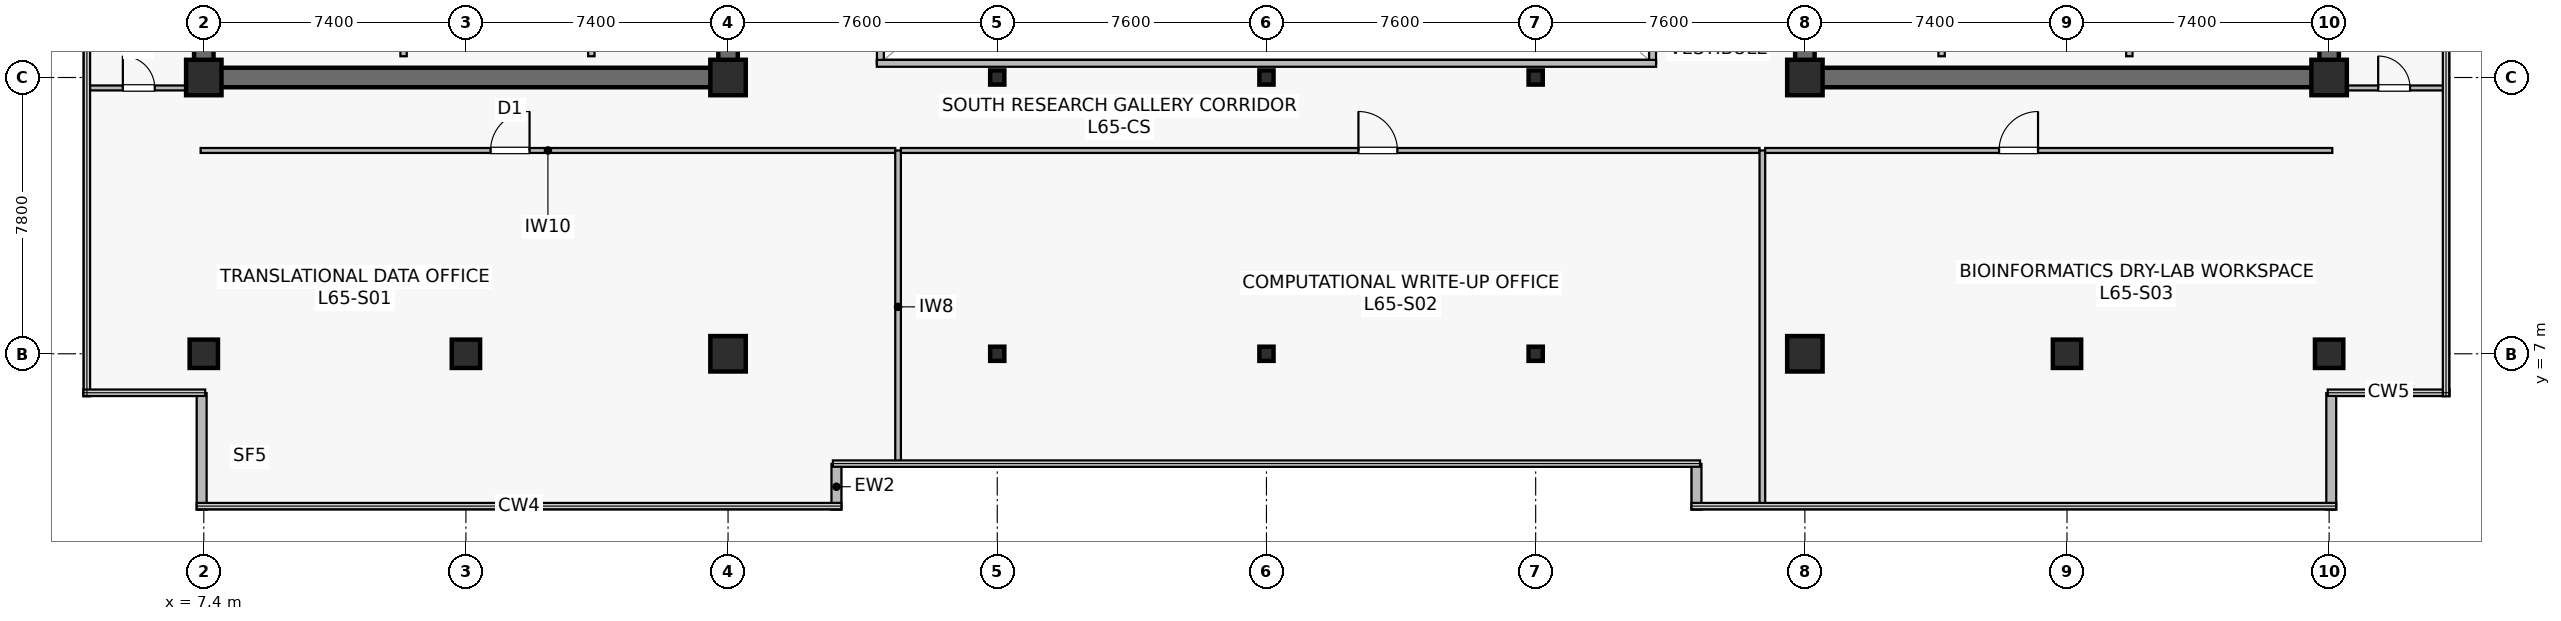
"""IFC4 building model, lengths in metres.
Left out: names, types, materials, properties, quantities, classifications, styles, units other than length and angle.
Written with IfcOpenShell. Run it as: python <this file> out.ifc"""

import sys

from ifc_helpers import new_model, si_unit, direction, frame, frame_2d, origin, origin_2d, place, context, subcontext, project, spatial, rectangle, hollow_rectangle, extrude, source, transform, mapped, element, fill, save


model = new_model("IFC4")
c1 = context("Model", 3, precision=1e-05, world=origin(), true_north=direction((0.0, 1.0)))
c2 = subcontext(c1, "Body", "Model", "MODEL_VIEW")
j1 = project(units=[si_unit("LENGTHUNIT", "METRE"), si_unit("PLANEANGLEUNIT", "RADIAN")], contexts=[c1])
p1 = place(None, origin())
s1 = spatial("IfcSite", under=j1, at=p1, CompositionType="ELEMENT")
p2 = place(p1, origin())
s2 = spatial("IfcBuilding", under=s1, at=p2, CompositionType="ELEMENT")
p3 = place(p2, frame((0.0, 0.0, 271.1)))
s3 = spatial("IfcBuildingStorey", under=s2, at=p3, CompositionType="ELEMENT", Elevation=271.1)
p4 = place(p3, frame((7.125, 14.8, 0.0), z_axis=(0.0, 0.0, 1.0), x_axis=(1.0, 0.0, 0.0)))
e1 = element("IfcWall", 1, at=p4, inside=s3, PredefinedType="SHEAR", context=c2, shape_type="SweptSolid", body=[
    extrude(rectangle(XDim=15.35, YDim=0.55, at=frame_2d((7.675, 0.0))), origin(), (0.0, 0.0, 1.0), 3.8),
])
p5 = place(p3, frame((7.4, 15.075, 0.0), z_axis=(0.0, 0.0, 1.0), x_axis=(0.0, 1.0, 0.0)))
e2 = element("IfcWall", 2, at=p5, inside=s3, PredefinedType="SHEAR", context=c2, shape_type="SweptSolid", body=[
    extrude(rectangle(XDim=18.45, YDim=0.55, at=frame_2d((9.225, 0.0))), origin(), (0.0, 0.0, 1.0), 3.8),
])
p6 = place(p3, frame((22.2, 15.075, 0.0), z_axis=(0.0, 0.0, 1.0), x_axis=(0.0, 1.0, 0.0)))
e3 = element("IfcWall", 3, at=p6, inside=s3, PredefinedType="SHEAR", context=c2, shape_type="SweptSolid", body=[
    extrude(rectangle(XDim=18.45, YDim=0.55, at=frame_2d((9.225, 0.0))), origin(), (0.0, 0.0, 1.0), 3.8),
])
p7 = place(p6, frame((3.475, 0.0, 0.0)))
e4 = element("IfcOpeningElement", 4, at=p7, cuts=e3, PredefinedType="OPENING", context=c2, shape_type="SweptSolid", body=[
    extrude(rectangle(XDim=1.42, YDim=2.2, at=frame_2d((0.71, 1.1))), frame((0.0, 0.285, 0.0), z_axis=(0.0, -1.0, 0.0), x_axis=(1.0, 0.0, 0.0)), (0.0, 0.0, 1.0), 0.57),
])
p8 = place(p3, frame((52.325, 14.8, 0.0), z_axis=(0.0, 0.0, 1.0), x_axis=(1.0, 0.0, 0.0)))
e5 = element("IfcWall", 5, at=p8, inside=s3, PredefinedType="SHEAR", context=c2, shape_type="SweptSolid", body=[
    extrude(rectangle(XDim=15.35, YDim=0.55, at=frame_2d((7.675, 0.0))), origin(), (0.0, 0.0, 1.0), 3.8),
])
p9 = place(p3, frame((52.6, 15.075, 0.0), z_axis=(0.0, 0.0, 1.0), x_axis=(0.0, 1.0, 0.0)))
e6 = element("IfcWall", 6, at=p9, inside=s3, PredefinedType="SHEAR", context=c2, shape_type="SweptSolid", body=[
    extrude(rectangle(XDim=18.45, YDim=0.55, at=frame_2d((9.225, 0.0))), origin(), (0.0, 0.0, 1.0), 3.8),
])
p10 = place(p9, frame((3.475, 0.0, 0.0)))
e7 = element("IfcOpeningElement", 7, at=p10, cuts=e6, PredefinedType="OPENING", context=c2, shape_type="SweptSolid", body=[
    extrude(rectangle(XDim=1.42, YDim=2.2, at=frame_2d((0.71, 1.1))), frame((0.0, 0.285, 0.0), z_axis=(0.0, -1.0, 0.0), x_axis=(1.0, 0.0, 0.0)), (0.0, 0.0, 1.0), 0.57),
])
p11 = place(p3, frame((67.4, 15.075, 0.0), z_axis=(0.0, 0.0, 1.0), x_axis=(0.0, 1.0, 0.0)))
e8 = element("IfcWall", 8, at=p11, inside=s3, PredefinedType="SHEAR", context=c2, shape_type="SweptSolid", body=[
    extrude(rectangle(XDim=18.45, YDim=0.55, at=frame_2d((9.225, 0.0))), origin(), (0.0, 0.0, 1.0), 3.8),
])
m1 = source(origin(), c2, "Body", "SweptSolid", [
    extrude(rectangle(XDim=0.8, YDim=0.8, at=origin_2d()), origin(), (0.0, 0.0, 1.0), 4.1),
])
p12 = place(p3, frame((14.8, 7.0, 0.0), z_axis=(0.0, 0.0, 1.0), x_axis=(1.0, 0.0, 0.0)))
e9 = element("IfcColumn", 9, at=p12, inside=s3, PredefinedType="COLUMN", context=c2, shape_type="MappedRepresentation", body=[
    mapped(m1, transform((0.0, 0.0, 0.0), scale=1.0)),
])
m2 = source(origin(), c2, "Body", "SweptSolid", [
    extrude(rectangle(XDim=1.0, YDim=1.0, at=origin_2d()), origin(), (0.0, 0.0, 1.0), 4.1),
])
for number, where, z_axis, x_axis in (
    (10, (22.2, 7.0, 0.0), (0.0, 0.0, 1.0), (1.0, 0.0, 0.0)),
    (11, (7.4, 14.8, 0.0), (0.0, 0.0, 1.0), (1.0, 0.0, 0.0)),
    (12, (22.2, 14.8, 0.0), (0.0, 0.0, 1.0), (1.0, 0.0, 0.0)),
    (13, (52.6, 7.0, 0.0), (0.0, 0.0, 1.0), (1.0, 0.0, 0.0)),
):
    element("IfcColumn", number, at=place(p3, frame(where, z_axis=z_axis, x_axis=x_axis)), inside=s3, PredefinedType="COLUMN", context=c2, shape_type="MappedRepresentation", body=[
        mapped(m2, transform((0.0, 0.0, 0.0), scale=1.0)),
    ])
p13 = place(p3, frame((60.0, 7.0, 0.0), z_axis=(0.0, 0.0, 1.0), x_axis=(1.0, 0.0, 0.0)))
e14 = element("IfcColumn", 14, at=p13, inside=s3, PredefinedType="COLUMN", context=c2, shape_type="MappedRepresentation", body=[
    mapped(m1, transform((0.0, 0.0, 0.0), scale=1.0)),
])
for number, where, z_axis, x_axis in (
    (15, (52.6, 14.8, 0.0), (0.0, 0.0, 1.0), (1.0, 0.0, 0.0)),
    (16, (67.4, 14.8, 0.0), (0.0, 0.0, 1.0), (1.0, 0.0, 0.0)),
):
    element("IfcColumn", number, at=place(p3, frame(where, z_axis=z_axis, x_axis=x_axis)), inside=s3, PredefinedType="COLUMN", context=c2, shape_type="MappedRepresentation", body=[
        mapped(m2, transform((0.0, 0.0, 0.0), scale=1.0)),
    ])
for number, where, z_axis, x_axis in (
    (17, (7.4, 7.0, 0.0), (0.0, 0.0, 1.0), (1.0, 0.0, 0.0)),
    (18, (67.4, 7.0, 0.0), (0.0, 0.0, 1.0), (1.0, 0.0, 0.0)),
):
    element("IfcColumn", number, at=place(p3, frame(where, z_axis=z_axis, x_axis=x_axis)), inside=s3, PredefinedType="COLUMN", context=c2, shape_type="MappedRepresentation", body=[
        mapped(m1, transform((0.0, 0.0, 0.0), scale=1.0)),
    ])
m3 = source(origin(), c2, "Body", "SweptSolid", [
    extrude(hollow_rectangle(XDim=0.4, YDim=0.4, WallThickness=0.019, at=origin_2d()), origin(), (0.0, 0.0, 1.0), 4.1),
])
for number, where, z_axis, x_axis in (
    (19, (29.8, 7.0, 0.0), (0.0, 0.0, 1.0), (1.0, 0.0, 0.0)),
    (20, (29.8, 14.8, 0.0), (0.0, 0.0, 1.0), (1.0, 0.0, 0.0)),
    (21, (37.4, 7.0, 0.0), (0.0, 0.0, 1.0), (1.0, 0.0, 0.0)),
    (22, (37.4, 14.8, 0.0), (0.0, 0.0, 1.0), (1.0, 0.0, 0.0)),
    (23, (45.0, 7.0, 0.0), (0.0, 0.0, 1.0), (1.0, 0.0, 0.0)),
    (24, (45.0, 14.8, 0.0), (0.0, 0.0, 1.0), (1.0, 0.0, 0.0)),
):
    element("IfcColumn", number, at=place(p3, frame(where, z_axis=z_axis, x_axis=x_axis)), inside=s3, PredefinedType="COLUMN", context=c2, shape_type="MappedRepresentation", body=[
        mapped(m3, transform((0.0, 0.0, 0.0), scale=1.0)),
    ])
for number, where, z_axis, x_axis in (
    (25, (25.26, 2.6, 0.0), (0.0, 0.0, 1.0), (0.0, 1.0, 0.0)),
    (26, (49.54, 3.893, 0.0), (0.0, 0.0, 1.0), (0.0, -1.0, 0.0)),
):
    element("IfcWall", number, at=place(p3, frame(where, z_axis=z_axis, x_axis=x_axis)), inside=s3, PredefinedType="STANDARD", context=c2, shape_type="SweptSolid", body=[
        extrude(rectangle(XDim=1.293, YDim=0.28, at=frame_2d((0.646, 0.0))), origin(), (0.0, 0.0, 1.0), 3.8),
    ])
for number, where, z_axis, x_axis in (
    (27, (67.46, 2.6, 0.0), (0.0, 0.0, 1.0), (0.0, 1.0, 0.0)),
    (28, (7.34, 5.888, 0.0), (0.0, 0.0, 1.0), (0.0, -1.0, 0.0)),
):
    element("IfcWall", number, at=place(p3, frame(where, z_axis=z_axis, x_axis=x_axis)), inside=s3, PredefinedType="STANDARD", context=c2, shape_type="SweptSolid", body=[
        extrude(rectangle(XDim=3.288, YDim=0.28, at=frame_2d((1.644, 0.0))), origin(), (0.0, 0.0, 1.0), 3.8),
    ])
for number, where, z_axis, x_axis in (
    (29, (13.04, 15.4, 0.0), (0.0, 0.0, 1.0), (0.0, 1.0, 0.0)),
    (30, (18.34, 15.4, 0.0), (0.0, 0.0, 1.0), (0.0, 1.0, 0.0)),
    (31, (61.76, 15.4, 0.0), (0.0, 0.0, 1.0), (0.0, 1.0, 0.0)),
    (32, (56.46, 15.4, 0.0), (0.0, 0.0, 1.0), (0.0, 1.0, 0.0)),
):
    element("IfcWall", number, at=place(p3, frame(where, z_axis=z_axis, x_axis=x_axis)), inside=s3, PredefinedType="SOLIDWALL", context=c2, shape_type="SweptSolid", body=[
        extrude(rectangle(XDim=2.4, YDim=0.18, at=frame_2d((1.2, 0.0))), origin(), (0.0, 0.0, 1.0), 3.8),
    ])
p14 = place(p3, frame((26.5, 15.2, 0.0), z_axis=(0.0, 0.0, 1.0), x_axis=(0.0, 1.0, 0.0)))
e33 = element("IfcWall", 33, at=p14, inside=s3, PredefinedType="SOLIDWALL", context=c2, shape_type="SweptSolid", body=[
    extrude(rectangle(XDim=18.2, YDim=0.195, at=frame_2d((9.1, 0.0))), origin(), (0.0, 0.0, 1.0), 3.8),
])
p15 = place(p14, frame((1.8, 0.0, 0.9)))
e34 = element("IfcOpeningElement", 34, at=p15, cuts=e33, PredefinedType="OPENING", context=c2, shape_type="SweptSolid", body=[
    extrude(rectangle(XDim=1.2, YDim=1.35, at=frame_2d((0.6, 0.675))), frame((0.0, 0.107, 0.0), z_axis=(0.0, -1.0, 0.0), x_axis=(1.0, 0.0, 0.0)), (0.0, 0.0, 1.0), 0.215),
])
p16 = place(p14, frame((13.2, 0.0, 0.9)))
e35 = element("IfcOpeningElement", 35, at=p16, cuts=e33, PredefinedType="OPENING", context=c2, shape_type="SweptSolid", body=[
    extrude(rectangle(XDim=1.2, YDim=1.35, at=frame_2d((0.6, 0.675))), frame((0.0, 0.107, 0.0), z_axis=(0.0, -1.0, 0.0), x_axis=(1.0, 0.0, 0.0)), (0.0, 0.0, 1.0), 0.215),
])
p17 = place(p3, frame((48.3, 15.2, 0.0), z_axis=(0.0, 0.0, 1.0), x_axis=(0.0, 1.0, 0.0)))
e36 = element("IfcWall", 36, at=p17, inside=s3, PredefinedType="SOLIDWALL", context=c2, shape_type="SweptSolid", body=[
    extrude(rectangle(XDim=18.2, YDim=0.195, at=frame_2d((9.1, 0.0))), origin(), (0.0, 0.0, 1.0), 3.8),
])
p18 = place(p17, frame((1.8, 0.0, 0.9)))
e37 = element("IfcOpeningElement", 37, at=p18, cuts=e36, PredefinedType="OPENING", context=c2, shape_type="SweptSolid", body=[
    extrude(rectangle(XDim=1.2, YDim=1.35, at=frame_2d((0.6, 0.675))), frame((0.0, 0.107, 0.0), z_axis=(0.0, -1.0, 0.0), x_axis=(1.0, 0.0, 0.0)), (0.0, 0.0, 1.0), 0.215),
])
p19 = place(p17, frame((13.2, 0.0, 0.9)))
e38 = element("IfcOpeningElement", 38, at=p19, cuts=e36, PredefinedType="OPENING", context=c2, shape_type="SweptSolid", body=[
    extrude(rectangle(XDim=1.2, YDim=1.35, at=frame_2d((0.6, 0.675))), frame((0.0, 0.107, 0.0), z_axis=(0.0, -1.0, 0.0), x_axis=(1.0, 0.0, 0.0)), (0.0, 0.0, 1.0), 0.215),
])
p20 = place(p3, frame((26.4, 15.2, 0.0), z_axis=(0.0, 0.0, 1.0), x_axis=(1.0, 0.0, 0.0)))
e39 = element("IfcWall", 39, at=p20, inside=s3, PredefinedType="SOLIDWALL", context=c2, shape_type="SweptSolid", body=[
    extrude(rectangle(XDim=22.0, YDim=0.195, at=frame_2d((11.0, 0.0))), origin(), (0.0, 0.0, 1.0), 3.8),
])
p21 = place(p3, frame((7.31, 12.74, 0.0), z_axis=(0.0, 0.0, 1.0), x_axis=(1.0, 0.0, 0.0)))
e40 = element("IfcWall", 40, at=p21, inside=s3, PredefinedType="PARTITIONING", context=c2, shape_type="SweptSolid", body=[
    extrude(rectangle(XDim=19.61, YDim=0.14, at=frame_2d((9.805, 0.0))), origin(), (0.0, 0.0, 1.0), 3.197),
])
p22 = place(p21, frame((8.186, 0.0, 0.0)))
e41 = element("IfcOpeningElement", 41, at=p22, cuts=e40, PredefinedType="OPENING", context=c2, shape_type="SweptSolid", body=[
    extrude(rectangle(XDim=1.1, YDim=2.18, at=frame_2d((0.55, 1.09))), frame((0.0, 0.08, 0.0), z_axis=(0.0, -1.0, 0.0), x_axis=(1.0, 0.0, 0.0)), (0.0, 0.0, 1.0), 0.16),
])
p23 = place(p3, frame((27.0, 3.91, 0.0), z_axis=(0.0, 0.0, 1.0), x_axis=(0.0, 1.0, 0.0)))
e42 = element("IfcWall", 42, at=p23, inside=s3, PredefinedType="PARTITIONING", context=c2, shape_type="SweptSolid", body=[
    extrude(rectangle(XDim=8.83, YDim=0.16, at=frame_2d((4.415, 0.0))), origin(), (0.0, 0.0, 1.0), 3.135),
])
p24 = place(p3, frame((27.08, 12.74, 0.0), z_axis=(0.0, 0.0, 1.0), x_axis=(1.0, 0.0, 0.0)))
e43 = element("IfcWall", 43, at=p24, inside=s3, PredefinedType="PARTITIONING", context=c2, shape_type="SweptSolid", body=[
    extrude(rectangle(XDim=24.24, YDim=0.14, at=frame_2d((12.12, 0.0))), origin(), (0.0, 0.0, 1.0), 3.197),
])
p25 = place(p24, frame((12.917, 0.0, 0.0)))
e44 = element("IfcOpeningElement", 44, at=p25, cuts=e43, PredefinedType="OPENING", context=c2, shape_type="SweptSolid", body=[
    extrude(rectangle(XDim=1.1, YDim=2.18, at=frame_2d((0.55, 1.09))), frame((0.0, 0.08, 0.0), z_axis=(0.0, -1.0, 0.0), x_axis=(1.0, 0.0, 0.0)), (0.0, 0.0, 1.0), 0.16),
])
p26 = place(p3, frame((51.4, 2.71, 0.0), z_axis=(0.0, 0.0, 1.0), x_axis=(0.0, 1.0, 0.0)))
e45 = element("IfcWall", 45, at=p26, inside=s3, PredefinedType="PARTITIONING", context=c2, shape_type="SweptSolid", body=[
    extrude(rectangle(XDim=10.03, YDim=0.16, at=frame_2d((5.015, 0.0))), origin(), (0.0, 0.0, 1.0), 3.135),
])
p27 = place(p3, frame((51.48, 12.74, 0.0), z_axis=(0.0, 0.0, 1.0), x_axis=(1.0, 0.0, 0.0)))
e46 = element("IfcWall", 46, at=p27, inside=s3, PredefinedType="PARTITIONING", context=c2, shape_type="SweptSolid", body=[
    extrude(rectangle(XDim=16.01, YDim=0.14, at=frame_2d((8.005, 0.0))), origin(), (0.0, 0.0, 1.0), 3.197),
])
p28 = place(p27, frame((6.602, 0.0, 0.0)))
e47 = element("IfcOpeningElement", 47, at=p28, cuts=e46, PredefinedType="OPENING", context=c2, shape_type="SweptSolid", body=[
    extrude(rectangle(XDim=1.1, YDim=2.18, at=frame_2d((0.55, 1.09))), frame((0.0, 0.08, 0.0), z_axis=(0.0, -1.0, 0.0), x_axis=(1.0, 0.0, 0.0)), (0.0, 0.0, 1.0), 0.16),
])
p29 = place(p3, frame((4.11, 14.505, 0.0), z_axis=(0.0, 0.0, 1.0), x_axis=(1.0, 0.0, 0.0)))
e48 = element("IfcWall", 48, at=p29, inside=s3, PredefinedType="PARTITIONING", context=c2, shape_type="SweptSolid", body=[
    extrude(rectangle(XDim=2.91, YDim=0.14, at=frame_2d((1.455, 0.0))), origin(), (0.0, 0.0, 1.0), 3.8),
])
p30 = place(p29, frame((1.005, 0.0, 0.0)))
e49 = element("IfcOpeningElement", 49, at=p30, cuts=e48, PredefinedType="OPENING", context=c2, shape_type="SweptSolid", body=[
    extrude(rectangle(XDim=0.9, YDim=2.1, at=frame_2d((0.45, 1.05))), frame((0.0, 0.08, 0.0), z_axis=(0.0, -1.0, 0.0), x_axis=(1.0, 0.0, 0.0)), (0.0, 0.0, 1.0), 0.16),
])
p31 = place(p3, frame((67.78, 14.505, 0.0), z_axis=(0.0, 0.0, 1.0), x_axis=(1.0, 0.0, 0.0)))
e50 = element("IfcWall", 50, at=p31, inside=s3, PredefinedType="PARTITIONING", context=c2, shape_type="SweptSolid", body=[
    extrude(rectangle(XDim=2.91, YDim=0.14, at=frame_2d((1.455, 0.0))), origin(), (0.0, 0.0, 1.0), 3.8),
])
p32 = place(p31, frame((1.005, 0.0, 0.0)))
e51 = element("IfcOpeningElement", 51, at=p32, cuts=e50, PredefinedType="OPENING", context=c2, shape_type="SweptSolid", body=[
    extrude(rectangle(XDim=0.9, YDim=2.1, at=frame_2d((0.45, 1.05))), frame((0.0, 0.08, 0.0), z_axis=(0.0, -1.0, 0.0), x_axis=(1.0, 0.0, 0.0)), (0.0, 0.0, 1.0), 0.16),
])
m4 = source(origin(), c2, "Body", "SweptSolid", [
    extrude(rectangle(XDim=1.1, YDim=2.18, at=frame_2d((0.55, 1.09))), frame((0.0, 0.025, 0.0), z_axis=(0.0, -1.0, 0.0), x_axis=(1.0, 0.0, 0.0)), (0.0, 0.0, 1.0), 0.05),
])
p33 = place(p22, origin())
e52 = element("IfcDoor", 52, at=p33, inside=s3, OperationType="SINGLE_SWING_RIGHT", PredefinedType="DOOR", context=c2, shape_type="MappedRepresentation", body=[
    mapped(m4, transform((0.0, 0.0, 0.0), scale=1.0)),
])
fill(e41, e52)
p34 = place(p25, origin())
e53 = element("IfcDoor", 53, at=p34, inside=s3, OperationType="SINGLE_SWING_LEFT", PredefinedType="DOOR", context=c2, shape_type="MappedRepresentation", body=[
    mapped(m4, transform((0.0, 0.0, 0.0), scale=1.0)),
])
fill(e44, e53)
p35 = place(p28, origin())
e54 = element("IfcDoor", 54, at=p35, inside=s3, OperationType="SINGLE_SWING_RIGHT", PredefinedType="DOOR", context=c2, shape_type="MappedRepresentation", body=[
    mapped(m4, transform((0.0, 0.0, 0.0), scale=1.0)),
])
fill(e47, e54)
m5 = source(origin(), c2, "Body", "SweptSolid", [
    extrude(rectangle(XDim=0.9, YDim=2.1, at=frame_2d((0.45, 1.05))), frame((0.0, 0.025, 0.0), z_axis=(0.0, -1.0, 0.0), x_axis=(1.0, 0.0, 0.0)), (0.0, 0.0, 1.0), 0.05),
])
p36 = place(p30, origin())
e55 = element("IfcDoor", 55, at=p36, inside=s3, OperationType="SINGLE_SWING_LEFT", PredefinedType="DOOR", context=c2, shape_type="MappedRepresentation", body=[
    mapped(m5, transform((0.0, 0.0, 0.0), scale=1.0)),
])
fill(e49, e55)
p37 = place(p32, origin())
e56 = element("IfcDoor", 56, at=p37, inside=s3, OperationType="SINGLE_SWING_LEFT", PredefinedType="DOOR", context=c2, shape_type="MappedRepresentation", body=[
    mapped(m5, transform((0.0, 0.0, 0.0), scale=1.0)),
])
fill(e51, e56)
save(model, sys.argv[1])
